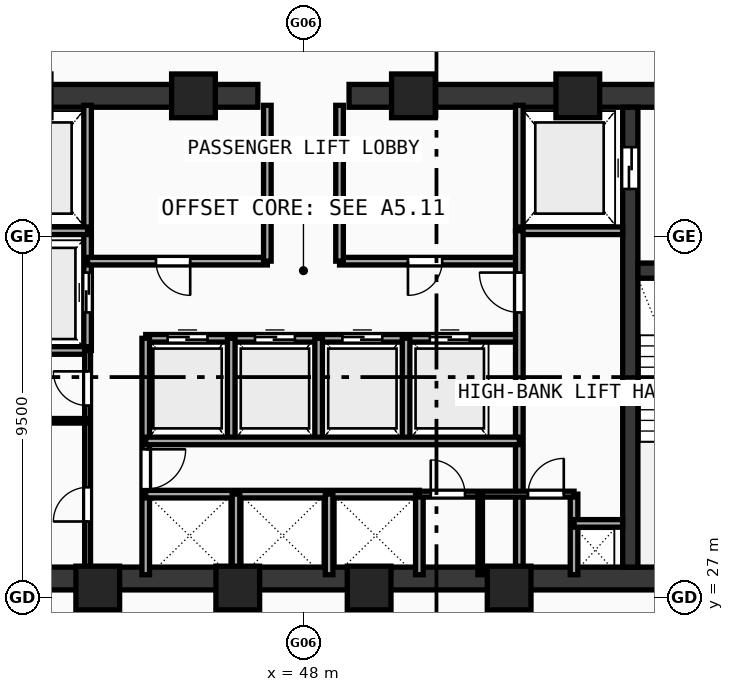
"""IFC4 building model, lengths in metres.
Left out: names, types, materials, properties, quantities, classifications, styles, units other than length and angle.
Written with IfcOpenShell. Run it as: python <this file> out.ifc"""

import sys

from ifc_helpers import new_model, si_unit, direction, frame, frame_2d, origin, origin_with_axes, origin_2d, place, context, subcontext, project, spatial, rectangle, hollow_rectangle, extrude, source, transform, mapped, element, fill, save


model = new_model("IFC4")
c1 = context("Model", 3, precision=1e-05, world=origin(), true_north=direction((0.0, 1.0)))
c2 = subcontext(c1, "Body", "Model", "MODEL_VIEW")
j1 = project(units=[si_unit("LENGTHUNIT", "METRE"), si_unit("PLANEANGLEUNIT", "RADIAN")], contexts=[c1])
p1 = place(None, origin())
s1 = spatial("IfcSite", under=j1, at=p1, CompositionType="ELEMENT")
p2 = place(p1, origin())
s2 = spatial("IfcBuilding", under=s1, at=p2, CompositionType="ELEMENT")
p3 = place(p2, frame((0.0, 0.0, 151.91)))
s3 = spatial("IfcBuildingStorey", under=s2, at=p3, CompositionType="ELEMENT", Elevation=151.91)
p4 = place(p3, frame((35.5, 27.5, 0.0), z_axis=(0.0, 0.0, 1.0), x_axis=(1.0, 0.0, 0.0)))
e1 = element("IfcWall", 1, at=p4, inside=s3, PredefinedType="SHEAR", context=c2, shape_type="SweptSolid", body=[
    extrude(rectangle(XDim=25.0, YDim=0.6, at=frame_2d((12.5, 0.0))), origin(), (0.0, 0.0, 1.0), 3.42),
])
p5 = place(p3, frame((35.5, 40.2, 0.0), z_axis=(0.0, 0.0, 1.0), x_axis=(1.0, 0.0, 0.0)))
e2 = element("IfcWall", 2, at=p5, inside=s3, PredefinedType="SHEAR", context=c2, shape_type="SweptSolid", body=[
    extrude(rectangle(XDim=11.3, YDim=0.6, at=frame_2d((5.65, 0.0))), origin(), (0.0, 0.0, 1.0), 3.42),
])
p6 = place(p5, frame((1.65, 0.0, 0.0)))
e3 = element("IfcOpeningElement", 3, at=p6, cuts=e2, PredefinedType="OPENING", context=c2, shape_type="SweptSolid", body=[
    extrude(rectangle(XDim=1.05, YDim=2.1, at=frame_2d((0.525, 1.05))), frame((0.0, 0.31, 0.0), z_axis=(0.0, -1.0, 0.0), x_axis=(1.0, 0.0, 0.0)), (0.0, 0.0, 1.0), 0.62),
])
p7 = place(p3, frame((49.2, 40.2, 0.0), z_axis=(0.0, 0.0, 1.0), x_axis=(1.0, 0.0, 0.0)))
e4 = element("IfcWall", 4, at=p7, inside=s3, PredefinedType="SHEAR", context=c2, shape_type="SweptSolid", body=[
    extrude(rectangle(XDim=11.3, YDim=0.6, at=frame_2d((5.65, 0.0))), origin(), (0.0, 0.0, 1.0), 3.42),
])
p8 = place(p7, frame((8.6, 0.0, 0.0)))
e5 = element("IfcOpeningElement", 5, at=p8, cuts=e4, PredefinedType="OPENING", context=c2, shape_type="SweptSolid", body=[
    extrude(rectangle(XDim=1.05, YDim=2.1, at=frame_2d((0.525, 1.05))), frame((0.0, 0.31, 0.0), z_axis=(0.0, -1.0, 0.0), x_axis=(1.0, 0.0, 0.0)), (0.0, 0.0, 1.0), 0.62),
])
p9 = place(p3, frame((56.6, 27.8, 0.0), z_axis=(0.0, 0.0, 1.0), x_axis=(0.0, 1.0, 0.0)))
e6 = element("IfcWall", 6, at=p9, inside=s3, PredefinedType="SHEAR", context=c2, shape_type="SweptSolid", body=[
    extrude(rectangle(XDim=12.1, YDim=0.4, at=frame_2d((6.05, 0.0))), origin(), (0.0, 0.0, 1.0), 3.42),
])
p10 = place(p9, frame((9.95, 0.0, 0.0)))
e7 = element("IfcOpeningElement", 7, at=p10, cuts=e6, PredefinedType="OPENING", context=c2, shape_type="SweptSolid", body=[
    extrude(rectangle(XDim=1.1, YDim=2.1, at=frame_2d((0.55, 1.05))), frame((0.0, 0.21, 0.0), z_axis=(0.0, -1.0, 0.0), x_axis=(1.0, 0.0, 0.0)), (0.0, 0.0, 1.0), 0.42),
])
p11 = place(p3, frame((56.8, 35.6, 0.0), z_axis=(0.0, 0.0, 1.0), x_axis=(1.0, 0.0, 0.0)))
e8 = element("IfcWall", 8, at=p11, inside=s3, PredefinedType="SHEAR", context=c2, shape_type="SweptSolid", body=[
    extrude(rectangle(XDim=3.1, YDim=0.4, at=frame_2d((1.55, 0.0))), origin(), (0.0, 0.0, 1.0), 3.42),
])
p12 = place(p11, frame((1.02, 0.0, 0.0)))
e9 = element("IfcOpeningElement", 9, at=p12, cuts=e8, PredefinedType="OPENING", context=c2, shape_type="SweptSolid", body=[
    extrude(rectangle(XDim=1.05, YDim=2.1, at=frame_2d((0.525, 1.05))), frame((0.0, 0.21, 0.0), z_axis=(0.0, -1.0, 0.0), x_axis=(1.0, 0.0, 0.0)), (0.0, 0.0, 1.0), 0.42),
])
m1 = source(origin(), c2, "Body", "SweptSolid", [
    extrude(hollow_rectangle(XDim=1.15, YDim=1.15, WallThickness=0.048, at=origin_2d()), origin(), (0.0, 0.0, 1.0), 3.68),
])
for number, where, z_axis, x_axis in (
    (10, (42.588, 27.25, -0.26), (0.0, 0.0, 1.0), (1.0, 0.0, 0.0)),
    (11, (46.272, 27.25, -0.26), (0.0, 0.0, 1.0), (1.0, 0.0, 0.0)),
    (12, (49.729, 27.25, -0.26), (0.0, 0.0, 1.0), (1.0, 0.0, 0.0)),
    (13, (53.412, 27.25, -0.26), (0.0, 0.0, 1.0), (1.0, 0.0, 0.0)),
    (14, (55.219, 40.2, -0.26), (0.0, 0.0, 1.0), (1.0, 0.0, 0.0)),
    (15, (50.894, 40.2, -0.26), (0.0, 0.0, 1.0), (1.0, 0.0, 0.0)),
    (16, (45.106, 40.2, -0.26), (0.0, 0.0, 1.0), (1.0, 0.0, 0.0)),
):
    element("IfcColumn", number, at=place(p3, frame(where, z_axis=z_axis, x_axis=x_axis)), inside=s3, PredefinedType="COLUMN", context=c2, shape_type="MappedRepresentation", body=[
        mapped(m1, transform((0.0, 0.0, 0.0), scale=1.0)),
    ])
p13 = place(p3, frame((42.32, 33.5, 0.0), z_axis=(0.0, 0.0, 1.0), x_axis=(0.0, 1.0, 0.0)))
e17 = element("IfcWall", 17, at=p13, inside=s3, PredefinedType="SOLIDWALL", context=c2, shape_type="SweptSolid", body=[
    extrude(rectangle(XDim=6.45, YDim=0.2, at=frame_2d((3.225, 0.0))), origin(), (0.0, 0.0, 1.0), 3.42),
])
p14 = place(p13, frame((1.0, 0.0, 0.0)))
e18 = element("IfcOpeningElement", 18, at=p14, cuts=e17, PredefinedType="OPENING", context=c2, shape_type="SweptSolid", body=[
    extrude(rectangle(XDim=1.05, YDim=2.1, at=frame_2d((0.525, 1.05))), frame((0.0, 0.11, 0.0), z_axis=(0.0, -1.0, 0.0), x_axis=(1.0, 0.0, 0.0)), (0.0, 0.0, 1.0), 0.22),
])
for number, where, z_axis, x_axis in (
    (19, (39.6, 36.65, 0.0), (0.0, 0.0, 1.0), (1.0, 0.0, 0.0)),
    (20, (39.6, 33.5, 0.0), (0.0, 0.0, 1.0), (1.0, 0.0, 0.0)),
):
    element("IfcWall", number, at=place(p3, frame(where, z_axis=z_axis, x_axis=x_axis)), inside=s3, PredefinedType="SOLIDWALL", context=c2, shape_type="SweptSolid", body=[
        extrude(rectangle(XDim=2.72, YDim=0.2, at=frame_2d((1.36, 0.0))), origin(), (0.0, 0.0, 1.0), 3.42),
    ])
p15 = place(p3, frame((53.68, 36.65, 0.0), z_axis=(0.0, 0.0, 1.0), x_axis=(0.0, 1.0, 0.0)))
e21 = element("IfcWall", 21, at=p15, inside=s3, PredefinedType="SOLIDWALL", context=c2, shape_type="SweptSolid", body=[
    extrude(rectangle(XDim=3.3, YDim=0.2, at=frame_2d((1.65, 0.0))), origin(), (0.0, 0.0, 1.0), 3.42),
])
p16 = place(p3, frame((53.68, 36.65, 0.0), z_axis=(0.0, 0.0, 1.0), x_axis=(1.0, 0.0, 0.0)))
e22 = element("IfcWall", 22, at=p16, inside=s3, PredefinedType="SOLIDWALL", context=c2, shape_type="SweptSolid", body=[
    extrude(rectangle(XDim=2.72, YDim=0.2, at=frame_2d((1.36, 0.0))), origin(), (0.0, 0.0, 1.0), 3.42),
])
p17 = place(p3, frame((42.32, 35.85, 0.0), z_axis=(0.0, 0.0, 1.0), x_axis=(1.0, 0.0, 0.0)))
e23 = element("IfcWall", 23, at=p17, inside=s3, PredefinedType="SOLIDWALL", context=c2, shape_type="SweptSolid", body=[
    extrude(rectangle(XDim=4.73, YDim=0.2, at=frame_2d((2.365, 0.0))), origin(), (0.0, 0.0, 1.0), 3.42),
])
p18 = place(p17, frame((1.8, 0.0, 0.0)))
e24 = element("IfcOpeningElement", 24, at=p18, cuts=e23, PredefinedType="OPENING", context=c2, shape_type="SweptSolid", body=[
    extrude(rectangle(XDim=0.9, YDim=2.1, at=frame_2d((0.45, 1.05))), frame((0.0, 0.11, 0.0), z_axis=(0.0, -1.0, 0.0), x_axis=(1.0, 0.0, 0.0)), (0.0, 0.0, 1.0), 0.22),
])
p19 = place(p3, frame((48.95, 35.85, 0.0), z_axis=(0.0, 0.0, 1.0), x_axis=(1.0, 0.0, 0.0)))
e25 = element("IfcWall", 25, at=p19, inside=s3, PredefinedType="SOLIDWALL", context=c2, shape_type="SweptSolid", body=[
    extrude(rectangle(XDim=4.73, YDim=0.2, at=frame_2d((2.365, 0.0))), origin(), (0.0, 0.0, 1.0), 3.42),
])
p20 = place(p19, frame((1.8, 0.0, 0.0)))
e26 = element("IfcOpeningElement", 26, at=p20, cuts=e25, PredefinedType="OPENING", context=c2, shape_type="SweptSolid", body=[
    extrude(rectangle(XDim=0.9, YDim=2.1, at=frame_2d((0.45, 1.05))), frame((0.0, 0.11, 0.0), z_axis=(0.0, -1.0, 0.0), x_axis=(1.0, 0.0, 0.0)), (0.0, 0.0, 1.0), 0.22),
])
for number, where, z_axis, x_axis in (
    (27, (47.05, 35.85, 0.0), (0.0, 0.0, 1.0), (0.0, 1.0, 0.0)),
    (28, (48.95, 35.85, 0.0), (0.0, 0.0, 1.0), (0.0, 1.0, 0.0)),
):
    element("IfcWall", number, at=place(p3, frame(where, z_axis=z_axis, x_axis=x_axis)), inside=s3, PredefinedType="SOLIDWALL", context=c2, shape_type="SweptSolid", body=[
        extrude(rectangle(XDim=4.1, YDim=0.2, at=frame_2d((2.05, 0.0))), origin(), (0.0, 0.0, 1.0), 3.42),
    ])
p21 = place(p3, frame((43.85, 33.82, 0.0), z_axis=(0.0, 0.0, 1.0), x_axis=(1.0, 0.0, 0.0)))
e29 = element("IfcWall", 29, at=p21, inside=s3, PredefinedType="SOLIDWALL", context=c2, shape_type="SweptSolid", body=[
    extrude(rectangle(XDim=9.83, YDim=0.2, at=frame_2d((4.915, 0.0))), origin(), (0.0, 0.0, 1.0), 3.42),
])
p22 = place(p21, frame((0.575, 0.0, 0.0)))
e30 = element("IfcOpeningElement", 30, at=p22, cuts=e29, PredefinedType="OPENING", context=c2, shape_type="SweptSolid", body=[
    extrude(rectangle(XDim=1.05, YDim=2.1, at=frame_2d((0.525, 1.05))), frame((0.0, 0.11, 0.0), z_axis=(0.0, -1.0, 0.0), x_axis=(1.0, 0.0, 0.0)), (0.0, 0.0, 1.0), 0.22),
])
p23 = place(p21, frame((2.875, 0.0, 0.0)))
e31 = element("IfcOpeningElement", 31, at=p23, cuts=e29, PredefinedType="OPENING", context=c2, shape_type="SweptSolid", body=[
    extrude(rectangle(XDim=1.05, YDim=2.1, at=frame_2d((0.525, 1.05))), frame((0.0, 0.11, 0.0), z_axis=(0.0, -1.0, 0.0), x_axis=(1.0, 0.0, 0.0)), (0.0, 0.0, 1.0), 0.22),
])
p24 = place(p21, frame((5.175, 0.0, 0.0)))
e32 = element("IfcOpeningElement", 32, at=p24, cuts=e29, PredefinedType="OPENING", context=c2, shape_type="SweptSolid", body=[
    extrude(rectangle(XDim=1.05, YDim=2.1, at=frame_2d((0.525, 1.05))), frame((0.0, 0.11, 0.0), z_axis=(0.0, -1.0, 0.0), x_axis=(1.0, 0.0, 0.0)), (0.0, 0.0, 1.0), 0.22),
])
p25 = place(p21, frame((7.475, 0.0, 0.0)))
e33 = element("IfcOpeningElement", 33, at=p25, cuts=e29, PredefinedType="OPENING", context=c2, shape_type="SweptSolid", body=[
    extrude(rectangle(XDim=1.05, YDim=2.1, at=frame_2d((0.525, 1.05))), frame((0.0, 0.11, 0.0), z_axis=(0.0, -1.0, 0.0), x_axis=(1.0, 0.0, 0.0)), (0.0, 0.0, 1.0), 0.22),
])
p26 = place(p3, frame((43.85, 27.6, 0.0), z_axis=(0.0, 0.0, 1.0), x_axis=(0.0, 1.0, 0.0)))
e34 = element("IfcWall", 34, at=p26, inside=s3, PredefinedType="SOLIDWALL", context=c2, shape_type="SweptSolid", body=[
    extrude(rectangle(XDim=6.22, YDim=0.2, at=frame_2d((3.11, 0.0))), origin(), (0.0, 0.0, 1.0), 3.42),
])
p27 = place(p26, frame((2.25, 0.0, 0.0)))
e35 = element("IfcOpeningElement", 35, at=p27, cuts=e34, PredefinedType="OPENING", context=c2, shape_type="SweptSolid", body=[
    extrude(rectangle(XDim=1.05, YDim=2.1, at=frame_2d((0.525, 1.05))), frame((0.0, 0.11, 0.0), z_axis=(0.0, -1.0, 0.0), x_axis=(1.0, 0.0, 0.0)), (0.0, 0.0, 1.0), 0.22),
])
p28 = place(p3, frame((53.68, 27.6, 0.0), z_axis=(0.0, 0.0, 1.0), x_axis=(0.0, 1.0, 0.0)))
e36 = element("IfcWall", 36, at=p28, inside=s3, PredefinedType="SOLIDWALL", context=c2, shape_type="SweptSolid", body=[
    extrude(rectangle(XDim=9.05, YDim=0.2, at=frame_2d((4.525, 0.0))), origin(), (0.0, 0.0, 1.0), 3.42),
])
p29 = place(p28, frame((6.9, 0.0, 0.0)))
e37 = element("IfcOpeningElement", 37, at=p29, cuts=e36, PredefinedType="OPENING", context=c2, shape_type="SweptSolid", body=[
    extrude(rectangle(XDim=1.05, YDim=2.1, at=frame_2d((0.525, 1.05))), frame((0.0, 0.11, 0.0), z_axis=(0.0, -1.0, 0.0), x_axis=(1.0, 0.0, 0.0)), (0.0, 0.0, 1.0), 0.22),
])
for number, where, z_axis, x_axis in (
    (38, (46.1, 31.12, 0.0), (0.0, 0.0, 1.0), (0.0, 1.0, 0.0)),
    (39, (48.4, 31.12, 0.0), (0.0, 0.0, 1.0), (0.0, 1.0, 0.0)),
    (40, (50.7, 31.12, 0.0), (0.0, 0.0, 1.0), (0.0, 1.0, 0.0)),
):
    element("IfcWall", number, at=place(p3, frame(where, z_axis=z_axis, x_axis=x_axis)), inside=s3, PredefinedType="SOLIDWALL", context=c2, shape_type="SweptSolid", body=[
        extrude(rectangle(XDim=2.7, YDim=0.2, at=frame_2d((1.35, 0.0))), origin(), (0.0, 0.0, 1.0), 3.42),
    ])
p30 = place(p3, frame((43.85, 29.72, 0.0), z_axis=(0.0, 0.0, 1.0), x_axis=(1.0, 0.0, 0.0)))
e41 = element("IfcWall", 41, at=p30, inside=s3, PredefinedType="SOLIDWALL", context=c2, shape_type="SweptSolid", body=[
    extrude(rectangle(XDim=7.2, YDim=0.2, at=frame_2d((3.6, 0.0))), origin(), (0.0, 0.0, 1.0), 3.42),
])
p31 = place(p3, frame((51.05, 27.6, 0.0), z_axis=(0.0, 0.0, 1.0), x_axis=(0.0, 1.0, 0.0)))
e42 = element("IfcWall", 42, at=p31, inside=s3, PredefinedType="SOLIDWALL", context=c2, shape_type="SweptSolid", body=[
    extrude(rectangle(XDim=2.12, YDim=0.2, at=frame_2d((1.06, 0.0))), origin(), (0.0, 0.0, 1.0), 3.42),
])
p32 = place(p3, frame((43.85, 31.12, 0.0), z_axis=(0.0, 0.0, 1.0), x_axis=(1.0, 0.0, 0.0)))
e43 = element("IfcWall", 43, at=p32, inside=s3, PredefinedType="SOLIDWALL", context=c2, shape_type="SweptSolid", body=[
    extrude(rectangle(XDim=9.83, YDim=0.2, at=frame_2d((4.915, 0.0))), origin(), (0.0, 0.0, 1.0), 3.42),
])
for number, where, z_axis, x_axis in (
    (44, (46.225, 27.6, 0.0), (0.0, 0.0, 1.0), (0.0, 1.0, 0.0)),
    (45, (48.675, 27.6, 0.0), (0.0, 0.0, 1.0), (0.0, 1.0, 0.0)),
    (46, (55.12, 27.6, 0.0), (0.0, 0.0, 1.0), (0.0, 1.0, 0.0)),
):
    element("IfcWall", number, at=place(p3, frame(where, z_axis=z_axis, x_axis=x_axis)), inside=s3, PredefinedType="SOLIDWALL", context=c2, shape_type="SweptSolid", body=[
        extrude(rectangle(XDim=2.12, YDim=0.2, at=frame_2d((1.06, 0.0))), origin(), (0.0, 0.0, 1.0), 3.42),
    ])
p33 = place(p3, frame((55.12, 28.95, 0.0), z_axis=(0.0, 0.0, 1.0), x_axis=(1.0, 0.0, 0.0)))
e47 = element("IfcWall", 47, at=p33, inside=s3, PredefinedType="SOLIDWALL", context=c2, shape_type="SweptSolid", body=[
    extrude(rectangle(XDim=1.28, YDim=0.2, at=frame_2d((0.64, 0.0))), origin(), (0.0, 0.0, 1.0), 3.42),
])
p34 = place(p3, frame((42.32, 27.6, 0.0), z_axis=(0.0, 0.0, 1.0), x_axis=(0.0, 1.0, 0.0)))
e48 = element("IfcWall", 48, at=p34, inside=s3, PredefinedType="PARTITIONING", context=c2, shape_type="SweptSolid", body=[
    extrude(rectangle(XDim=5.9, YDim=0.155, at=frame_2d((2.95, 0.0))), origin(), (0.0, 0.0, 1.0), 3.42),
])
p35 = place(p34, frame((1.4, 0.0, 0.0)))
e49 = element("IfcOpeningElement", 49, at=p35, cuts=e48, PredefinedType="OPENING", context=c2, shape_type="SweptSolid", body=[
    extrude(rectangle(XDim=0.9, YDim=2.1, at=frame_2d((0.45, 1.05))), frame((0.0, 0.087, 0.0), z_axis=(0.0, -1.0, 0.0), x_axis=(1.0, 0.0, 0.0)), (0.0, 0.0, 1.0), 0.175),
])
p36 = place(p34, frame((4.45, 0.0, 0.0)))
e50 = element("IfcOpeningElement", 50, at=p36, cuts=e48, PredefinedType="OPENING", context=c2, shape_type="SweptSolid", body=[
    extrude(rectangle(XDim=0.9, YDim=2.1, at=frame_2d((0.45, 1.05))), frame((0.0, 0.087, 0.0), z_axis=(0.0, -1.0, 0.0), x_axis=(1.0, 0.0, 0.0)), (0.0, 0.0, 1.0), 0.175),
])
p37 = place(p3, frame((51.05, 29.72, 0.0), z_axis=(0.0, 0.0, 1.0), x_axis=(1.0, 0.0, 0.0)))
e51 = element("IfcWall", 51, at=p37, inside=s3, PredefinedType="PARTITIONING", context=c2, shape_type="SweptSolid", body=[
    extrude(rectangle(XDim=4.07, YDim=0.155, at=frame_2d((2.035, 0.0))), origin(), (0.0, 0.0, 1.0), 3.42),
])
p38 = place(p37, frame((0.3, 0.0, 0.0)))
e52 = element("IfcOpeningElement", 52, at=p38, cuts=e51, PredefinedType="OPENING", context=c2, shape_type="SweptSolid", body=[
    extrude(rectangle(XDim=0.9, YDim=2.1, at=frame_2d((0.45, 1.05))), frame((0.0, 0.087, 0.0), z_axis=(0.0, -1.0, 0.0), x_axis=(1.0, 0.0, 0.0)), (0.0, 0.0, 1.0), 0.175),
])
p39 = place(p37, frame((2.86, 0.0, 0.0)))
e53 = element("IfcOpeningElement", 53, at=p39, cuts=e51, PredefinedType="OPENING", context=c2, shape_type="SweptSolid", body=[
    extrude(rectangle(XDim=0.94, YDim=2.1, at=frame_2d((0.47, 1.05))), frame((0.0, 0.087, 0.0), z_axis=(0.0, -1.0, 0.0), x_axis=(1.0, 0.0, 0.0)), (0.0, 0.0, 1.0), 0.175),
])
p40 = place(p3, frame((39.6, 31.65, 0.0), z_axis=(0.0, 0.0, 1.0), x_axis=(1.0, 0.0, 0.0)))
e54 = element("IfcWall", 54, at=p40, inside=s3, PredefinedType="PARTITIONING", context=c2, shape_type="SweptSolid", body=[
    extrude(rectangle(XDim=2.72, YDim=0.12, at=frame_2d((1.36, 0.0))), origin(), (0.0, 0.0, 1.0), 3.42),
])
p41 = place(p3, frame((52.65, 27.6, 0.0), z_axis=(0.0, 0.0, 1.0), x_axis=(0.0, 1.0, 0.0)))
e55 = element("IfcWall", 55, at=p41, inside=s3, PredefinedType="PARTITIONING", context=c2, shape_type="SweptSolid", body=[
    extrude(rectangle(XDim=2.12, YDim=0.12, at=frame_2d((1.06, 0.0))), origin(), (0.0, 0.0, 1.0), 3.42),
])
m2 = source(origin(), c2, "Body", "SweptSolid", [
    extrude(rectangle(XDim=1.1, YDim=2.1, at=frame_2d((0.55, 1.05))), frame((0.0, 0.025, 0.0), z_axis=(0.0, -1.0, 0.0), x_axis=(1.0, 0.0, 0.0)), (0.0, 0.0, 1.0), 0.05),
])
p42 = place(p10, origin_with_axes())
e56 = element("IfcDoor", 56, at=p42, inside=s3, OperationType="DOUBLE_DOOR_SLIDING", PredefinedType="DOOR", context=c2, shape_type="MappedRepresentation", body=[
    mapped(m2, transform((0.0, 0.0, 0.0), scale=1.0)),
])
fill(e7, e56)
m3 = source(origin(), c2, "Body", "SweptSolid", [
    extrude(rectangle(XDim=1.05, YDim=2.1, at=frame_2d((0.525, 1.05))), frame((0.0, 0.025, 0.0), z_axis=(0.0, -1.0, 0.0), x_axis=(1.0, 0.0, 0.0)), (0.0, 0.0, 1.0), 0.05),
])
p43 = place(p14, origin_with_axes())
e57 = element("IfcDoor", 57, at=p43, inside=s3, OperationType="DOUBLE_DOOR_SLIDING", PredefinedType="DOOR", context=c2, shape_type="MappedRepresentation", body=[
    mapped(m3, transform((0.0, 0.0, 0.0), scale=1.0)),
])
fill(e18, e57)
m4 = source(origin(), c2, "Body", "SweptSolid", [
    extrude(rectangle(XDim=0.9, YDim=2.1, at=frame_2d((0.45, 1.05))), frame((0.0, 0.025, 0.0), z_axis=(0.0, -1.0, 0.0), x_axis=(1.0, 0.0, 0.0)), (0.0, 0.0, 1.0), 0.05),
])
p44 = place(p18, frame((0.9, 0.0, 0.0), z_axis=(0.0, 0.0, 1.0), x_axis=(-1.0, 0.0, 0.0)))
e58 = element("IfcDoor", 58, at=p44, inside=s3, OperationType="SINGLE_SWING_LEFT", PredefinedType="DOOR", context=c2, shape_type="MappedRepresentation", body=[
    mapped(m4, transform((0.0, 0.0, 0.0), scale=1.0)),
])
fill(e24, e58)
p45 = place(p20, frame((0.9, 0.0, 0.0), z_axis=(0.0, 0.0, 1.0), x_axis=(-1.0, 0.0, 0.0)))
e59 = element("IfcDoor", 59, at=p45, inside=s3, OperationType="SINGLE_SWING_RIGHT", PredefinedType="DOOR", context=c2, shape_type="MappedRepresentation", body=[
    mapped(m4, transform((0.0, 0.0, 0.0), scale=1.0)),
])
fill(e26, e59)
p46 = place(p22, origin_with_axes())
e60 = element("IfcDoor", 60, at=p46, inside=s3, OperationType="DOUBLE_DOOR_SLIDING", PredefinedType="DOOR", context=c2, shape_type="MappedRepresentation", body=[
    mapped(m3, transform((0.0, 0.0, 0.0), scale=1.0)),
])
fill(e30, e60)
p47 = place(p23, origin_with_axes())
e61 = element("IfcDoor", 61, at=p47, inside=s3, OperationType="DOUBLE_DOOR_SLIDING", PredefinedType="DOOR", context=c2, shape_type="MappedRepresentation", body=[
    mapped(m3, transform((0.0, 0.0, 0.0), scale=1.0)),
])
fill(e31, e61)
p48 = place(p24, origin_with_axes())
e62 = element("IfcDoor", 62, at=p48, inside=s3, OperationType="DOUBLE_DOOR_SLIDING", PredefinedType="DOOR", context=c2, shape_type="MappedRepresentation", body=[
    mapped(m3, transform((0.0, 0.0, 0.0), scale=1.0)),
])
fill(e32, e62)
p49 = place(p25, origin_with_axes())
e63 = element("IfcDoor", 63, at=p49, inside=s3, OperationType="DOUBLE_DOOR_SLIDING", PredefinedType="DOOR", context=c2, shape_type="MappedRepresentation", body=[
    mapped(m3, transform((0.0, 0.0, 0.0), scale=1.0)),
])
fill(e33, e63)
p50 = place(p27, frame((1.05, 0.0, 0.0), z_axis=(0.0, 0.0, 1.0), x_axis=(-1.0, 0.0, 0.0)))
e64 = element("IfcDoor", 64, at=p50, inside=s3, OperationType="SINGLE_SWING_LEFT", PredefinedType="DOOR", context=c2, shape_type="MappedRepresentation", body=[
    mapped(m3, transform((0.0, 0.0, 0.0), scale=1.0)),
])
fill(e35, e64)
p51 = place(p29, origin_with_axes())
e65 = element("IfcDoor", 65, at=p51, inside=s3, OperationType="SINGLE_SWING_RIGHT", PredefinedType="DOOR", context=c2, shape_type="MappedRepresentation", body=[
    mapped(m3, transform((0.0, 0.0, 0.0), scale=1.0)),
])
fill(e37, e65)
p52 = place(p35, origin_with_axes())
e66 = element("IfcDoor", 66, at=p52, inside=s3, OperationType="SINGLE_SWING_LEFT", PredefinedType="DOOR", context=c2, shape_type="MappedRepresentation", body=[
    mapped(m4, transform((0.0, 0.0, 0.0), scale=1.0)),
])
fill(e49, e66)
p53 = place(p36, origin_with_axes())
e67 = element("IfcDoor", 67, at=p53, inside=s3, OperationType="SINGLE_SWING_RIGHT", PredefinedType="DOOR", context=c2, shape_type="MappedRepresentation", body=[
    mapped(m4, transform((0.0, 0.0, 0.0), scale=1.0)),
])
fill(e50, e67)
p54 = place(p38, origin_with_axes())
e68 = element("IfcDoor", 68, at=p54, inside=s3, OperationType="SINGLE_SWING_LEFT", PredefinedType="DOOR", context=c2, shape_type="MappedRepresentation", body=[
    mapped(m4, transform((0.0, 0.0, 0.0), scale=1.0)),
])
fill(e52, e68)
m5 = source(origin(), c2, "Body", "SweptSolid", [
    extrude(rectangle(XDim=0.94, YDim=2.1, at=frame_2d((0.47, 1.05))), frame((0.0, 0.025, 0.0), z_axis=(0.0, -1.0, 0.0), x_axis=(1.0, 0.0, 0.0)), (0.0, 0.0, 1.0), 0.05),
])
p55 = place(p39, origin_with_axes())
e69 = element("IfcDoor", 69, at=p55, inside=s3, OperationType="SINGLE_SWING_RIGHT", PredefinedType="DOOR", context=c2, shape_type="MappedRepresentation", body=[
    mapped(m5, transform((0.0, 0.0, 0.0), scale=1.0)),
])
fill(e53, e69)
save(model, sys.argv[1])
